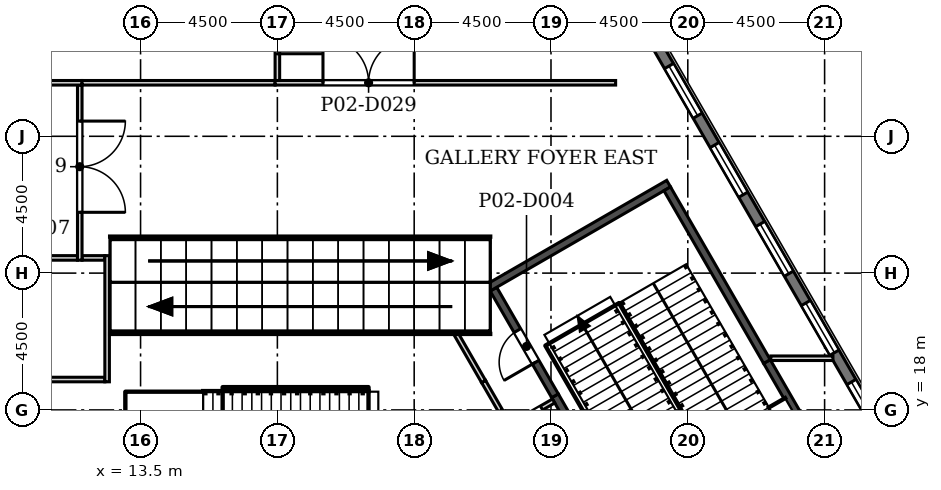
"""IFC4 building model, lengths in metres.
Left out: names, types, materials, properties, quantities, classifications, styles, units other than length and angle.
Written with IfcOpenShell. Run it as: python <this file> out.ifc"""

import sys

from ifc_helpers import new_model, si_unit, direction, frame, frame_2d, origin, place, context, subcontext, project, spatial, rectangle, extrude, element, fill, save


model = new_model("IFC4")
c1 = context("Model", 3, precision=1e-05, world=origin(), true_north=direction((0.0, 1.0)))
c2 = subcontext(c1, "Body", "Model", "MODEL_VIEW")
j1 = project(units=[si_unit("LENGTHUNIT", "METRE"), si_unit("PLANEANGLEUNIT", "RADIAN")], contexts=[c1])
p1 = place(None, origin())
s1 = spatial("IfcSite", under=j1, at=p1, CompositionType="ELEMENT")
p2 = place(p1, origin())
s2 = spatial("IfcBuilding", under=s1, at=p2, CompositionType="ELEMENT")
p3 = place(p2, frame((0.0, 0.0, 14.0)))
s3 = spatial("IfcBuildingStorey", under=s2, at=p3, CompositionType="ELEMENT", Elevation=14.0)
p4 = place(p3, frame((13.394, 10.703, 0.0), z_axis=(0.0, 0.0, 1.0), x_axis=(-0.50000187635, 0.866024320471, 0.0)))
e1 = element("IfcWall", 1, at=p4, inside=s3, PredefinedType="SHEAR", context=c2, shape_type="SweptSolid", body=[
    extrude(rectangle(XDim=9.177, YDim=1.4, at=frame_2d((4.588, 0.0))), origin(), (0.0, 0.0, 1.0), 6.0),
])
p5 = place(p3, frame((42.853, 8.575, 0.0), z_axis=(0.0, 0.0, 1.0), x_axis=(-0.49999894854, 0.866026010844, 0.0)))
e2 = element("IfcWall", 2, at=p5, inside=s3, PredefinedType="SOLIDWALL", context=c2, shape_type="SweptSolid", body=[
    extrude(rectangle(XDim=76.0, YDim=0.34, at=frame_2d((38.0, 0.0))), origin(), (0.0, 0.0, 1.0), 5.7),
])
p6 = place(p5, frame((1.058, 0.0, 0.9)))
e3 = element("IfcOpeningElement", 3, at=p6, cuts=e2, PredefinedType="OPENING", context=c2, shape_type="SweptSolid", body=[
    extrude(rectangle(XDim=1.885, YDim=3.5, at=frame_2d((0.942, 1.75))), frame((0.0, 0.18, 0.0), z_axis=(0.0, -1.0, 0.0), x_axis=(1.0, 0.0, 0.0)), (0.0, 0.0, 1.0), 0.36),
])
p7 = place(p5, frame((4.058, 0.0, 0.9)))
e4 = element("IfcOpeningElement", 4, at=p7, cuts=e2, PredefinedType="OPENING", context=c2, shape_type="SweptSolid", body=[
    extrude(rectangle(XDim=1.885, YDim=3.5, at=frame_2d((0.942, 1.75))), frame((0.0, 0.18, 0.0), z_axis=(0.0, -1.0, 0.0), x_axis=(1.0, 0.0, 0.0)), (0.0, 0.0, 1.0), 0.36),
])
p8 = place(p5, frame((7.058, 0.0, 0.9)))
e5 = element("IfcOpeningElement", 5, at=p8, cuts=e2, PredefinedType="OPENING", context=c2, shape_type="SweptSolid", body=[
    extrude(rectangle(XDim=1.885, YDim=3.5, at=frame_2d((0.942, 1.75))), frame((0.0, 0.18, 0.0), z_axis=(0.0, -1.0, 0.0), x_axis=(1.0, 0.0, 0.0)), (0.0, 0.0, 1.0), 0.36),
])
p9 = place(p5, frame((10.058, 0.0, 0.9)))
e6 = element("IfcOpeningElement", 6, at=p9, cuts=e2, PredefinedType="OPENING", context=c2, shape_type="SweptSolid", body=[
    extrude(rectangle(XDim=1.885, YDim=3.5, at=frame_2d((0.942, 1.75))), frame((0.0, 0.18, 0.0), z_axis=(0.0, -1.0, 0.0), x_axis=(1.0, 0.0, 0.0)), (0.0, 0.0, 1.0), 0.36),
])
p10 = place(p5, frame((13.058, 0.0, 0.9)))
e7 = element("IfcOpeningElement", 7, at=p10, cuts=e2, PredefinedType="OPENING", context=c2, shape_type="SweptSolid", body=[
    extrude(rectangle(XDim=1.885, YDim=3.5, at=frame_2d((0.942, 1.75))), frame((0.0, 0.18, 0.0), z_axis=(0.0, -1.0, 0.0), x_axis=(1.0, 0.0, 0.0)), (0.0, 0.0, 1.0), 0.36),
])
p11 = place(p5, frame((16.058, 0.0, 0.9)))
e8 = element("IfcOpeningElement", 8, at=p11, cuts=e2, PredefinedType="OPENING", context=c2, shape_type="SweptSolid", body=[
    extrude(rectangle(XDim=1.885, YDim=3.5, at=frame_2d((0.942, 1.75))), frame((0.0, 0.18, 0.0), z_axis=(0.0, -1.0, 0.0), x_axis=(1.0, 0.0, 0.0)), (0.0, 0.0, 1.0), 0.36),
])
p12 = place(p5, frame((19.058, 0.0, 0.9)))
e9 = element("IfcOpeningElement", 9, at=p12, cuts=e2, PredefinedType="OPENING", context=c2, shape_type="SweptSolid", body=[
    extrude(rectangle(XDim=1.885, YDim=3.5, at=frame_2d((0.942, 1.75))), frame((0.0, 0.18, 0.0), z_axis=(0.0, -1.0, 0.0), x_axis=(1.0, 0.0, 0.0)), (0.0, 0.0, 1.0), 0.36),
])
p13 = place(p5, frame((22.058, 0.0, 0.9)))
e10 = element("IfcOpeningElement", 10, at=p13, cuts=e2, PredefinedType="OPENING", context=c2, shape_type="SweptSolid", body=[
    extrude(rectangle(XDim=1.885, YDim=3.5, at=frame_2d((0.942, 1.75))), frame((0.0, 0.18, 0.0), z_axis=(0.0, -1.0, 0.0), x_axis=(1.0, 0.0, 0.0)), (0.0, 0.0, 1.0), 0.36),
])
p14 = place(p5, frame((25.058, 0.0, 0.9)))
e11 = element("IfcOpeningElement", 11, at=p14, cuts=e2, PredefinedType="OPENING", context=c2, shape_type="SweptSolid", body=[
    extrude(rectangle(XDim=1.885, YDim=3.5, at=frame_2d((0.942, 1.75))), frame((0.0, 0.18, 0.0), z_axis=(0.0, -1.0, 0.0), x_axis=(1.0, 0.0, 0.0)), (0.0, 0.0, 1.0), 0.36),
])
p15 = place(p5, frame((28.058, 0.0, 0.9)))
e12 = element("IfcOpeningElement", 12, at=p15, cuts=e2, PredefinedType="OPENING", context=c2, shape_type="SweptSolid", body=[
    extrude(rectangle(XDim=1.885, YDim=3.5, at=frame_2d((0.942, 1.75))), frame((0.0, 0.18, 0.0), z_axis=(0.0, -1.0, 0.0), x_axis=(1.0, 0.0, 0.0)), (0.0, 0.0, 1.0), 0.36),
])
p16 = place(p5, frame((31.058, 0.0, 0.9)))
e13 = element("IfcOpeningElement", 13, at=p16, cuts=e2, PredefinedType="OPENING", context=c2, shape_type="SweptSolid", body=[
    extrude(rectangle(XDim=1.885, YDim=3.5, at=frame_2d((0.942, 1.75))), frame((0.0, 0.18, 0.0), z_axis=(0.0, -1.0, 0.0), x_axis=(1.0, 0.0, 0.0)), (0.0, 0.0, 1.0), 0.36),
])
p17 = place(p5, frame((34.058, 0.0, 0.9)))
e14 = element("IfcOpeningElement", 14, at=p17, cuts=e2, PredefinedType="OPENING", context=c2, shape_type="SweptSolid", body=[
    extrude(rectangle(XDim=1.885, YDim=3.5, at=frame_2d((0.942, 1.75))), frame((0.0, 0.18, 0.0), z_axis=(0.0, -1.0, 0.0), x_axis=(1.0, 0.0, 0.0)), (0.0, 0.0, 1.0), 0.36),
])
p18 = place(p5, frame((37.058, 0.0, 0.9)))
e15 = element("IfcOpeningElement", 15, at=p18, cuts=e2, PredefinedType="OPENING", context=c2, shape_type="SweptSolid", body=[
    extrude(rectangle(XDim=1.885, YDim=3.5, at=frame_2d((0.942, 1.75))), frame((0.0, 0.18, 0.0), z_axis=(0.0, -1.0, 0.0), x_axis=(1.0, 0.0, 0.0)), (0.0, 0.0, 1.0), 0.36),
])
p19 = place(p5, frame((40.058, 0.0, 0.9)))
e16 = element("IfcOpeningElement", 16, at=p19, cuts=e2, PredefinedType="OPENING", context=c2, shape_type="SweptSolid", body=[
    extrude(rectangle(XDim=1.885, YDim=3.5, at=frame_2d((0.942, 1.75))), frame((0.0, 0.18, 0.0), z_axis=(0.0, -1.0, 0.0), x_axis=(1.0, 0.0, 0.0)), (0.0, 0.0, 1.0), 0.36),
])
p20 = place(p5, frame((43.058, 0.0, 0.9)))
e17 = element("IfcOpeningElement", 17, at=p20, cuts=e2, PredefinedType="OPENING", context=c2, shape_type="SweptSolid", body=[
    extrude(rectangle(XDim=1.885, YDim=3.5, at=frame_2d((0.942, 1.75))), frame((0.0, 0.18, 0.0), z_axis=(0.0, -1.0, 0.0), x_axis=(1.0, 0.0, 0.0)), (0.0, 0.0, 1.0), 0.36),
])
p21 = place(p5, frame((46.058, 0.0, 0.9)))
e18 = element("IfcOpeningElement", 18, at=p21, cuts=e2, PredefinedType="OPENING", context=c2, shape_type="SweptSolid", body=[
    extrude(rectangle(XDim=1.885, YDim=3.5, at=frame_2d((0.942, 1.75))), frame((0.0, 0.18, 0.0), z_axis=(0.0, -1.0, 0.0), x_axis=(1.0, 0.0, 0.0)), (0.0, 0.0, 1.0), 0.36),
])
p22 = place(p5, frame((49.058, 0.0, 0.9)))
e19 = element("IfcOpeningElement", 19, at=p22, cuts=e2, PredefinedType="OPENING", context=c2, shape_type="SweptSolid", body=[
    extrude(rectangle(XDim=1.885, YDim=3.5, at=frame_2d((0.942, 1.75))), frame((0.0, 0.18, 0.0), z_axis=(0.0, -1.0, 0.0), x_axis=(1.0, 0.0, 0.0)), (0.0, 0.0, 1.0), 0.36),
])
p23 = place(p5, frame((52.058, 0.0, 0.9)))
e20 = element("IfcOpeningElement", 20, at=p23, cuts=e2, PredefinedType="OPENING", context=c2, shape_type="SweptSolid", body=[
    extrude(rectangle(XDim=1.885, YDim=3.5, at=frame_2d((0.942, 1.75))), frame((0.0, 0.18, 0.0), z_axis=(0.0, -1.0, 0.0), x_axis=(1.0, 0.0, 0.0)), (0.0, 0.0, 1.0), 0.36),
])
p24 = place(p5, frame((55.058, 0.0, 0.9)))
e21 = element("IfcOpeningElement", 21, at=p24, cuts=e2, PredefinedType="OPENING", context=c2, shape_type="SweptSolid", body=[
    extrude(rectangle(XDim=1.885, YDim=3.5, at=frame_2d((0.942, 1.75))), frame((0.0, 0.18, 0.0), z_axis=(0.0, -1.0, 0.0), x_axis=(1.0, 0.0, 0.0)), (0.0, 0.0, 1.0), 0.36),
])
p25 = place(p5, frame((58.058, 0.0, 0.9)))
e22 = element("IfcOpeningElement", 22, at=p25, cuts=e2, PredefinedType="OPENING", context=c2, shape_type="SweptSolid", body=[
    extrude(rectangle(XDim=1.885, YDim=3.5, at=frame_2d((0.942, 1.75))), frame((0.0, 0.18, 0.0), z_axis=(0.0, -1.0, 0.0), x_axis=(1.0, 0.0, 0.0)), (0.0, 0.0, 1.0), 0.36),
])
p26 = place(p5, frame((61.058, 0.0, 0.9)))
e23 = element("IfcOpeningElement", 23, at=p26, cuts=e2, PredefinedType="OPENING", context=c2, shape_type="SweptSolid", body=[
    extrude(rectangle(XDim=1.885, YDim=3.5, at=frame_2d((0.942, 1.75))), frame((0.0, 0.18, 0.0), z_axis=(0.0, -1.0, 0.0), x_axis=(1.0, 0.0, 0.0)), (0.0, 0.0, 1.0), 0.36),
])
p27 = place(p5, frame((64.058, 0.0, 0.9)))
e24 = element("IfcOpeningElement", 24, at=p27, cuts=e2, PredefinedType="OPENING", context=c2, shape_type="SweptSolid", body=[
    extrude(rectangle(XDim=1.885, YDim=3.5, at=frame_2d((0.942, 1.75))), frame((0.0, 0.18, 0.0), z_axis=(0.0, -1.0, 0.0), x_axis=(1.0, 0.0, 0.0)), (0.0, 0.0, 1.0), 0.36),
])
p28 = place(p5, frame((67.058, 0.0, 0.9)))
e25 = element("IfcOpeningElement", 25, at=p28, cuts=e2, PredefinedType="OPENING", context=c2, shape_type="SweptSolid", body=[
    extrude(rectangle(XDim=1.885, YDim=3.5, at=frame_2d((0.942, 1.75))), frame((0.0, 0.18, 0.0), z_axis=(0.0, -1.0, 0.0), x_axis=(1.0, 0.0, 0.0)), (0.0, 0.0, 1.0), 0.36),
])
p29 = place(p5, frame((70.058, 0.0, 0.9)))
e26 = element("IfcOpeningElement", 26, at=p29, cuts=e2, PredefinedType="OPENING", context=c2, shape_type="SweptSolid", body=[
    extrude(rectangle(XDim=1.885, YDim=3.5, at=frame_2d((0.942, 1.75))), frame((0.0, 0.18, 0.0), z_axis=(0.0, -1.0, 0.0), x_axis=(1.0, 0.0, 0.0)), (0.0, 0.0, 1.0), 0.36),
])
p30 = place(p5, frame((73.058, 0.0, 0.9)))
e27 = element("IfcOpeningElement", 27, at=p30, cuts=e2, PredefinedType="OPENING", context=c2, shape_type="SweptSolid", body=[
    extrude(rectangle(XDim=1.885, YDim=3.5, at=frame_2d((0.942, 1.75))), frame((0.0, 0.18, 0.0), z_axis=(0.0, -1.0, 0.0), x_axis=(1.0, 0.0, 0.0)), (0.0, 0.0, 1.0), 0.36),
])
p31 = place(p3, frame((30.907, 11.927, 0.0), z_axis=(0.0, 0.0, 1.0), x_axis=(-0.499985572004, 0.866033733632, 0.0)))
e28 = element("IfcWall", 28, at=p31, inside=s3, PredefinedType="SOLIDWALL", context=c2, shape_type="SweptSolid", body=[
    extrude(rectangle(XDim=7.55, YDim=0.25, at=frame_2d((3.775, 0.0))), origin(), (0.0, 0.0, 1.0), 5.7),
])
p32 = place(p3, frame((25.337, 17.975, 0.0), z_axis=(0.0, 0.0, 1.0), x_axis=(-0.50011622646, 0.865958290007, 0.0)))
e29 = element("IfcWall", 29, at=p32, inside=s3, PredefinedType="PARTITIONING", context=c2, shape_type="SweptSolid", body=[
    extrude(rectangle(XDim=1.109, YDim=0.15, at=frame_2d((0.555, 0.0))), origin(), (0.0, 0.0, 1.0), 5.7),
])
p33 = place(p3, frame((27.087, 18.294, 0.0), z_axis=(0.0, 0.0, 1.0), x_axis=(-0.866100518934, -0.499869874169, 0.0)))
e30 = element("IfcWall", 30, at=p33, inside=s3, PredefinedType="PARTITIONING", context=c2, shape_type="SweptSolid", body=[
    extrude(rectangle(XDim=1.816, YDim=0.15, at=frame_2d((0.908, 0.0))), origin(), (0.0, 0.0, 1.0), 5.7),
])
p34 = place(p33, frame((0.461, 0.0, 0.0)))
e31 = element("IfcOpeningElement", 31, at=p34, cuts=e30, PredefinedType="OPENING", context=c2, shape_type="SweptSolid", body=[
    extrude(rectangle(XDim=1.1, YDim=2.1, at=frame_2d((0.55, 1.05))), frame((0.0, 0.085, 0.0), z_axis=(0.0, -1.0, 0.0), x_axis=(1.0, 0.0, 0.0)), (0.0, 0.0, 1.0), 0.17),
])
p35 = place(p3, frame((27.132, 18.465, 0.0), z_axis=(0.0, 0.0, 1.0), x_axis=(-0.499971214291, 0.866042022584, 0.0)))
e32 = element("IfcWall", 32, at=p35, inside=s3, PredefinedType="SOLIDWALL", context=c2, shape_type="SweptSolid", body=[
    extrude(rectangle(XDim=4.05, YDim=0.25, at=frame_2d((2.025, 0.0))), origin(), (0.0, 0.0, 1.0), 5.7),
])
p36 = place(p35, frame((1.275, 0.0, 0.0)))
e33 = element("IfcOpeningElement", 33, at=p36, cuts=e32, PredefinedType="OPENING", context=c2, shape_type="SweptSolid", body=[
    extrude(rectangle(XDim=1.2, YDim=2.1, at=frame_2d((0.6, 1.05))), frame((0.0, 0.135, 0.0), z_axis=(0.0, -1.0, 0.0), x_axis=(1.0, 0.0, 0.0)), (0.0, 0.0, 1.0), 0.27),
])
p37 = place(p3, frame((24.782, 18.935, 0.0), z_axis=(0.0, 0.0, 1.0), x_axis=(-0.499962016178, 0.866047332643, 0.0)))
e34 = element("IfcWall", 34, at=p37, inside=s3, PredefinedType="PARTITIONING", context=c2, shape_type="SweptSolid", body=[
    extrude(rectangle(XDim=1.882, YDim=0.15, at=frame_2d((0.941, 0.0))), origin(), (0.0, 0.0, 1.0), 5.7),
])
p38 = place(p3, frame((12.325, 19.0, 0.0), z_axis=(0.0, 0.0, 1.0), x_axis=(-1.0, 0.0, 0.0)))
e35 = element("IfcWall", 35, at=p38, inside=s3, PredefinedType="PARTITIONING", context=c2, shape_type="SweptSolid", body=[
    extrude(rectangle(XDim=2.65, YDim=0.15, at=frame_2d((1.325, 0.0))), origin(), (0.0, 0.0, 1.0), 5.7),
])
p39 = place(p3, frame((34.103, 19.592, 0.0), z_axis=(0.0, 0.0, 1.0), x_axis=(0.499981253467, -0.86603622683, 0.0)))
e36 = element("IfcWall", 36, at=p39, inside=s3, PredefinedType="SOLIDWALL", context=c2, shape_type="SweptSolid", body=[
    extrude(rectangle(XDim=4.791, YDim=0.25, at=frame_2d((2.396, 0.0))), origin(), (0.0, 0.0, 1.0), 5.7),
])
p40 = place(p3, frame((34.229, 19.7, 0.0), z_axis=(0.0, 0.0, 1.0), x_axis=(1.0, 0.0, 0.0)))
e37 = element("IfcWall", 37, at=p40, inside=s3, PredefinedType="PARTITIONING", context=c2, shape_type="SweptSolid", body=[
    extrude(rectangle(XDim=2.044, YDim=0.15, at=frame_2d((1.022, 0.0))), origin(), (0.0, 0.0, 1.0), 5.7),
])
p41 = place(p3, frame((24.936, 22.018, 0.0), z_axis=(0.0, 0.0, 1.0), x_axis=(0.866050272892, 0.499956922968, 0.0)))
e38 = element("IfcWall", 38, at=p41, inside=s3, PredefinedType="SOLIDWALL", context=c2, shape_type="SweptSolid", body=[
    extrude(rectangle(XDim=6.85, YDim=0.25, at=frame_2d((3.425, 0.0))), origin(), (0.0, 0.0, 1.0), 5.7),
])
p42 = place(p3, frame((9.675, 23.0, 0.0), z_axis=(0.0, 0.0, 1.0), x_axis=(1.0, 0.0, 0.0)))
e39 = element("IfcWall", 39, at=p42, inside=s3, PredefinedType="PARTITIONING", context=c2, shape_type="SweptSolid", body=[
    extrude(rectangle(XDim=1.75, YDim=0.15, at=frame_2d((0.875, 0.0))), origin(), (0.0, 0.0, 1.0), 5.7),
])
p43 = place(p3, frame((11.575, 23.0, 0.0), z_axis=(0.0, 0.0, 1.0), x_axis=(1.0, 0.0, 0.0)))
e40 = element("IfcWall", 40, at=p43, inside=s3, PredefinedType="PARTITIONING", context=c2, shape_type="SweptSolid", body=[
    extrude(rectangle(XDim=0.75, YDim=0.15, at=frame_2d((0.375, 0.0))), origin(), (0.0, 0.0, 1.0), 5.7),
])
p44 = place(p3, frame((12.4, 23.075, 0.0), z_axis=(0.0, 0.0, 1.0), x_axis=(0.0, -1.0, 0.0)))
e41 = element("IfcWall", 41, at=p44, inside=s3, PredefinedType="PARTITIONING", context=c2, shape_type="SweptSolid", body=[
    extrude(rectangle(XDim=4.15, YDim=0.15, at=frame_2d((2.075, 0.0))), origin(), (0.0, 0.0, 1.0), 5.7),
])
p45 = place(p3, frame((30.823, 25.272, 0.0), z_axis=(0.0, 0.0, 1.0), x_axis=(0.499978056798, -0.866038072327, 0.0)))
e42 = element("IfcWall", 42, at=p45, inside=s3, PredefinedType="SOLIDWALL", context=c2, shape_type="SweptSolid", body=[
    extrude(rectangle(XDim=6.559, YDim=0.25, at=frame_2d((3.28, 0.0))), origin(), (0.0, 0.0, 1.0), 5.7),
])
p46 = place(p3, frame((11.5, 28.685, 0.0), z_axis=(0.0, 0.0, 1.0), x_axis=(0.0, -1.0, 0.0)))
e43 = element("IfcWall", 43, at=p46, inside=s3, PredefinedType="PARTITIONING", context=c2, shape_type="SweptSolid", body=[
    extrude(rectangle(XDim=5.76, YDim=0.15, at=frame_2d((2.88, 0.0))), origin(), (0.0, 0.0, 1.0), 5.7),
])
p47 = place(p46, frame((1.185, 0.0, 0.0)))
e44 = element("IfcOpeningElement", 44, at=p47, cuts=e43, PredefinedType="OPENING", context=c2, shape_type="SweptSolid", body=[
    extrude(rectangle(XDim=3.0, YDim=2.4, at=frame_2d((1.5, 1.2))), frame((0.0, 0.085, 0.0), z_axis=(0.0, -1.0, 0.0), x_axis=(1.0, 0.0, 0.0)), (0.0, 0.0, 1.0), 0.17),
])
p48 = place(p3, frame((4.105, 28.76, 0.0), z_axis=(0.0, 0.0, 1.0), x_axis=(1.0, 0.0, 0.0)))
e45 = element("IfcWall", 45, at=p48, inside=s3, PredefinedType="PARTITIONING", context=c2, shape_type="SweptSolid", body=[
    extrude(rectangle(XDim=7.47, YDim=0.15, at=frame_2d((3.735, 0.0))), origin(), (0.0, 0.0, 1.0), 5.7),
])
p49 = place(p48, frame((0.395, 0.0, 0.0)))
e46 = element("IfcOpeningElement", 46, at=p49, cuts=e45, PredefinedType="OPENING", context=c2, shape_type="SweptSolid", body=[
    extrude(rectangle(XDim=3.0, YDim=2.4, at=frame_2d((1.5, 1.2))), frame((0.0, 0.085, 0.0), z_axis=(0.0, -1.0, 0.0), x_axis=(1.0, 0.0, 0.0)), (0.0, 0.0, 1.0), 0.17),
])
p50 = place(p3, frame((11.575, 28.76, 0.0), z_axis=(0.0, 0.0, 1.0), x_axis=(1.0, 0.0, 0.0)))
e47 = element("IfcWall", 47, at=p50, inside=s3, PredefinedType="PARTITIONING", context=c2, shape_type="SweptSolid", body=[
    extrude(rectangle(XDim=6.35, YDim=0.15, at=frame_2d((3.175, 0.0))), origin(), (0.0, 0.0, 1.0), 5.7),
])
p51 = place(p3, frame((17.925, 28.76, 0.0), z_axis=(0.0, 0.0, 1.0), x_axis=(1.0, 0.0, 0.0)))
e48 = element("IfcWall", 48, at=p51, inside=s3, PredefinedType="PARTITIONING", context=c2, shape_type="SweptSolid", body=[
    extrude(rectangle(XDim=11.201, YDim=0.15, at=frame_2d((5.601, 0.0))), origin(), (0.0, 0.0, 1.0), 5.7),
])
p52 = place(p51, frame((1.575, 0.0, 0.0)))
e49 = element("IfcOpeningElement", 49, at=p52, cuts=e48, PredefinedType="OPENING", context=c2, shape_type="SweptSolid", body=[
    extrude(rectangle(XDim=3.0, YDim=2.4, at=frame_2d((1.5, 1.2))), frame((0.0, 0.085, 0.0), z_axis=(0.0, -1.0, 0.0), x_axis=(1.0, 0.0, 0.0)), (0.0, 0.0, 1.0), 0.17),
])
p53 = place(p3, frame((18.0, 28.835, 0.0), z_axis=(0.0, 0.0, 1.0), x_axis=(0.0, 1.0, 0.0)))
e50 = element("IfcWall", 50, at=p53, inside=s3, PredefinedType="PARTITIONING", context=c2, shape_type="SweptSolid", body=[
    extrude(rectangle(XDim=4.0, YDim=0.15, at=frame_2d((2.0, 0.0))), origin(), (0.0, 0.0, 1.0), 5.7),
])
p54 = place(p53, frame((0.88, 0.0, 0.0)))
e51 = element("IfcOpeningElement", 51, at=p54, cuts=e50, PredefinedType="OPENING", context=c2, shape_type="SweptSolid", body=[
    extrude(rectangle(XDim=3.0, YDim=2.4, at=frame_2d((1.5, 1.2))), frame((0.0, 0.085, 0.0), z_axis=(0.0, -1.0, 0.0), x_axis=(1.0, 0.0, 0.0)), (0.0, 0.0, 1.0), 0.17),
])
p55 = place(p3, frame((13.125, 13.45, 0.0), z_axis=(0.0, 0.0, 1.0), x_axis=(0.0, 1.0, 0.0)))
e52 = element("IfcWall", 52, at=p55, inside=s3, PredefinedType="SOLIDWALL", context=c2, shape_type="SweptSolid", body=[
    extrude(rectangle(XDim=5.1, YDim=0.25, at=frame_2d((2.55, 0.0))), origin(), (0.0, 0.0, 1.0), 2.8),
])
p56 = place(p3, frame((13.125, 18.475, 0.0), z_axis=(0.0, 0.0, 1.0), x_axis=(1.0, 0.0, 0.0)))
e53 = element("IfcWall", 53, at=p56, inside=s3, PredefinedType="SOLIDWALL", context=c2, shape_type="SweptSolid", body=[
    extrude(rectangle(XDim=2.31, YDim=0.25, at=frame_2d((1.155, 0.0))), origin(), (0.0, 0.0, 1.0), 2.8),
])
p57 = place(p9, origin())
e54 = element("IfcWindow", 54, at=p57, inside=s3, PartitioningType="SINGLE_PANEL", PredefinedType="WINDOW", context=c2, shape_type="SweptSolid", body=[
    extrude(rectangle(XDim=1.885, YDim=3.5, at=frame_2d((0.942, 1.75))), frame((0.0, 0.11, 0.0), z_axis=(0.0, -1.0, 0.0), x_axis=(1.0, 0.0, 0.0)), (0.0, 0.0, 1.0), 0.06),
])
fill(e6, e54)
p58 = place(p10, origin())
e55 = element("IfcWindow", 55, at=p58, inside=s3, PartitioningType="SINGLE_PANEL", PredefinedType="WINDOW", context=c2, shape_type="SweptSolid", body=[
    extrude(rectangle(XDim=1.885, YDim=3.5, at=frame_2d((0.942, 1.75))), frame((0.0, 0.11, 0.0), z_axis=(0.0, -1.0, 0.0), x_axis=(1.0, 0.0, 0.0)), (0.0, 0.0, 1.0), 0.06),
])
fill(e7, e55)
p59 = place(p11, origin())
e56 = element("IfcWindow", 56, at=p59, inside=s3, PartitioningType="SINGLE_PANEL", PredefinedType="WINDOW", context=c2, shape_type="SweptSolid", body=[
    extrude(rectangle(XDim=1.885, YDim=3.5, at=frame_2d((0.942, 1.75))), frame((0.0, 0.11, 0.0), z_axis=(0.0, -1.0, 0.0), x_axis=(1.0, 0.0, 0.0)), (0.0, 0.0, 1.0), 0.06),
])
fill(e8, e56)
p60 = place(p12, origin())
e57 = element("IfcWindow", 57, at=p60, inside=s3, PartitioningType="SINGLE_PANEL", PredefinedType="WINDOW", context=c2, shape_type="SweptSolid", body=[
    extrude(rectangle(XDim=1.885, YDim=3.5, at=frame_2d((0.942, 1.75))), frame((0.0, 0.11, 0.0), z_axis=(0.0, -1.0, 0.0), x_axis=(1.0, 0.0, 0.0)), (0.0, 0.0, 1.0), 0.06),
])
fill(e9, e57)
p61 = place(p13, origin())
e58 = element("IfcWindow", 58, at=p61, inside=s3, PartitioningType="SINGLE_PANEL", PredefinedType="WINDOW", context=c2, shape_type="SweptSolid", body=[
    extrude(rectangle(XDim=1.885, YDim=3.5, at=frame_2d((0.942, 1.75))), frame((0.0, 0.11, 0.0), z_axis=(0.0, -1.0, 0.0), x_axis=(1.0, 0.0, 0.0)), (0.0, 0.0, 1.0), 0.06),
])
fill(e10, e58)
p62 = place(p36, origin())
e59 = element("IfcDoor", 59, at=p62, inside=s3, OperationType="SINGLE_SWING_LEFT", PredefinedType="DOOR", context=c2, shape_type="SweptSolid", body=[
    extrude(rectangle(XDim=1.2, YDim=2.1, at=frame_2d((0.6, 1.05))), frame((0.0, 0.025, 0.0), z_axis=(0.0, -1.0, 0.0), x_axis=(1.0, 0.0, 0.0)), (0.0, 0.0, 1.0), 0.05),
])
fill(e33, e59)
p63 = place(p34, origin())
e60 = element("IfcDoor", 60, at=p63, inside=s3, OperationType="SINGLE_SWING_RIGHT", PredefinedType="DOOR", context=c2, shape_type="SweptSolid", body=[
    extrude(rectangle(XDim=1.1, YDim=2.1, at=frame_2d((0.55, 1.05))), frame((0.0, 0.025, 0.0), z_axis=(0.0, -1.0, 0.0), x_axis=(1.0, 0.0, 0.0)), (0.0, 0.0, 1.0), 0.05),
])
fill(e31, e60)
p64 = place(p47, origin())
e61 = element("IfcDoor", 61, at=p64, inside=s3, OperationType="DOUBLE_DOOR_SINGLE_SWING", PredefinedType="DOOR", context=c2, shape_type="SweptSolid", body=[
    extrude(rectangle(XDim=3.0, YDim=2.4, at=frame_2d((1.5, 1.2))), frame((0.0, 0.025, 0.0), z_axis=(0.0, -1.0, 0.0), x_axis=(1.0, 0.0, 0.0)), (0.0, 0.0, 1.0), 0.05),
])
fill(e44, e61)
p65 = place(p54, frame((3.0, 0.0, 0.0), z_axis=(0.0, 0.0, 1.0), x_axis=(-1.0, 0.0, 0.0)))
e62 = element("IfcDoor", 62, at=p65, inside=s3, OperationType="DOUBLE_DOOR_SINGLE_SWING", PredefinedType="DOOR", context=c2, shape_type="SweptSolid", body=[
    extrude(rectangle(XDim=3.0, YDim=2.4, at=frame_2d((1.5, 1.2))), frame((0.0, 0.025, 0.0), z_axis=(0.0, -1.0, 0.0), x_axis=(1.0, 0.0, 0.0)), (0.0, 0.0, 1.0), 0.05),
])
fill(e51, e62)
p66 = place(p52, origin())
e63 = element("IfcDoor", 63, at=p66, inside=s3, OperationType="DOUBLE_DOOR_SINGLE_SWING", PredefinedType="DOOR", context=c2, shape_type="SweptSolid", body=[
    extrude(rectangle(XDim=3.0, YDim=2.4, at=frame_2d((1.5, 1.2))), frame((0.0, 0.025, 0.0), z_axis=(0.0, -1.0, 0.0), x_axis=(1.0, 0.0, 0.0)), (0.0, 0.0, 1.0), 0.05),
])
fill(e49, e63)
save(model, sys.argv[1])
